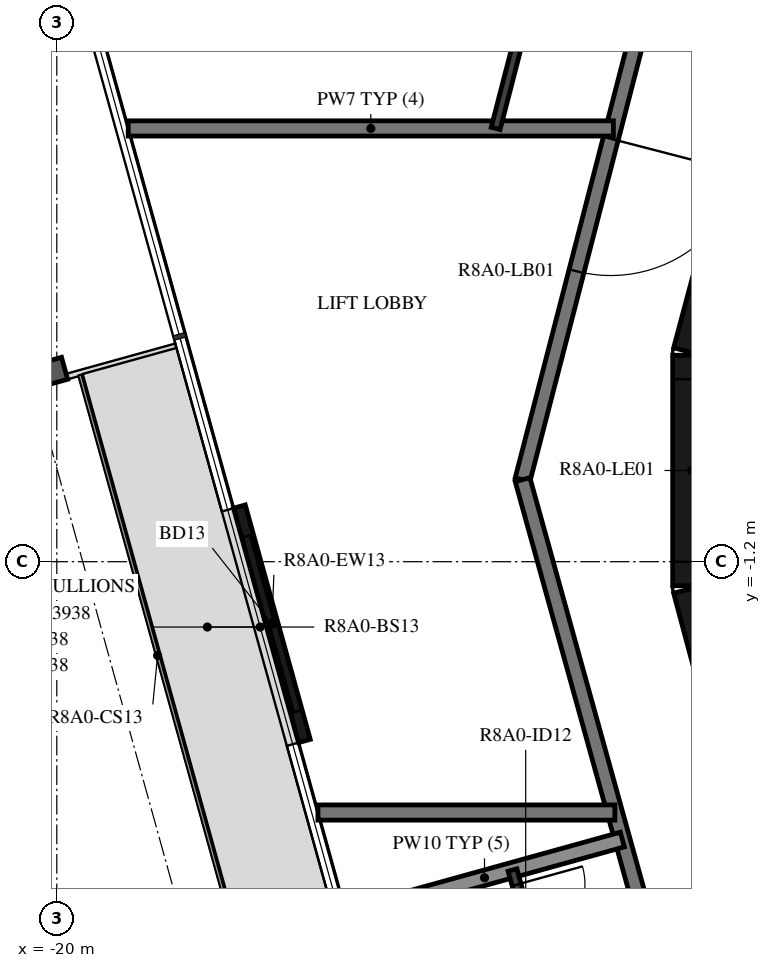
"""IFC4 building model, lengths in metres.
Left out: names, types, materials, properties, quantities, classifications, styles, units other than length and angle.
Written with IfcOpenShell. Run it as: python <this file> out.ifc"""

import sys

from ifc_helpers import new_model, si_unit, direction, frame, frame_2d, origin, origin_2d, place, context, subcontext, project, spatial, rectangle, i_section, extrude, element, fill, save


model = new_model("IFC4")
c1 = context("Model", 3, precision=1e-05, world=origin(), true_north=direction((0.0, 1.0)))
c2 = subcontext(c1, "Body", "Model", "MODEL_VIEW")
j1 = project(units=[si_unit("LENGTHUNIT", "METRE"), si_unit("PLANEANGLEUNIT", "RADIAN")], contexts=[c1])
p1 = place(None, origin())
s1 = spatial("IfcSite", under=j1, at=p1, CompositionType="ELEMENT")
p2 = place(p1, origin())
s2 = spatial("IfcBuilding", under=s1, at=p2, CompositionType="ELEMENT")
p3 = place(p2, frame((0.0, 0.0, 305.2)))
s3 = spatial("IfcBuildingStorey", under=s2, at=p3, CompositionType="ELEMENT", Elevation=305.2)
p4 = place(p3, frame((-20.331, 1.224, -0.38), z_axis=(0.0, 0.0, 1.0), x_axis=(-0.267238143562, 0.963630517691, 0.0)))
e1 = element("IfcColumn", 1, at=p4, inside=s3, PredefinedType="COLUMN", context=c2, shape_type="SweptSolid", body=[
    extrude(i_section(OverallWidth=0.3, OverallDepth=0.9, WebThickness=0.019, FlangeThickness=0.035, FilletRadius=0.03, at=origin_2d()), origin(), (0.0, 0.0, 1.0), 3.5),
])
p5 = place(p3, frame((-17.598, -0.475, 0.0), z_axis=(0.0, 0.0, 1.0), x_axis=(0.267266077957, -0.963622770369, 0.0)))
e2 = element("IfcWall", 2, at=p5, inside=s3, PredefinedType="STANDARD", context=c2, shape_type="SweptSolid", body=[
    extrude(rectangle(XDim=3.2, YDim=0.16, at=frame_2d((1.6, 0.0))), origin(), (0.0, 0.0, 1.0), 3.12),
])
p6 = place(p5, frame((0.4, 0.0, 0.0)))
e3 = element("IfcOpeningElement", 3, at=p6, cuts=e2, PredefinedType="OPENING", context=c2, shape_type="SweptSolid", body=[
    extrude(rectangle(XDim=2.4, YDim=2.4, at=frame_2d((1.2, 1.2))), frame((0.0, 0.09, 0.0), z_axis=(0.0, -1.0, 0.0), x_axis=(1.0, 0.0, 0.0)), (0.0, 0.0, 1.0), 0.18),
])
p7 = place(p3, frame((-10.858, 4.479, 0.0), z_axis=(0.0, 0.0, 1.0), x_axis=(-0.258734743916, -0.965948410781, 0.0)))
e4 = element("IfcWall", 4, at=p7, inside=s3, PredefinedType="SHEAR", context=c2, shape_type="SweptSolid", body=[
    extrude(rectangle(XDim=3.033, YDim=0.5, at=frame_2d((1.516, 0.0))), origin(), (0.0, 0.0, 1.0), 3.12),
])
p8 = place(p3, frame((-11.647, 1.516, 0.0), z_axis=(0.0, 0.0, 1.0), x_axis=(0.0, -1.0, 0.0)))
e5 = element("IfcWall", 5, at=p8, inside=s3, PredefinedType="SHEAR", context=c2, shape_type="SweptSolid", body=[
    extrude(rectangle(XDim=3.033, YDim=0.5, at=frame_2d((1.516, 0.0))), origin(), (0.0, 0.0, 1.0), 3.12),
])
p9 = place(p8, frame((0.316, 0.0, 0.0)))
e6 = element("IfcOpeningElement", 6, at=p9, cuts=e5, PredefinedType="OPENING", context=c2, shape_type="SweptSolid", body=[
    extrude(rectangle(XDim=2.4, YDim=2.1, at=frame_2d((1.2, 1.05))), frame((0.0, 0.26, 0.0), z_axis=(0.0, -1.0, 0.0), x_axis=(1.0, 0.0, 0.0)), (0.0, 0.0, 1.0), 0.52),
])
p10 = place(p3, frame((-11.643, -1.55, 0.0), z_axis=(0.0, 0.0, 1.0), x_axis=(0.258734743916, -0.965948410781, 0.0)))
e7 = element("IfcWall", 7, at=p10, inside=s3, PredefinedType="SHEAR", context=c2, shape_type="SweptSolid", body=[
    extrude(rectangle(XDim=3.033, YDim=0.5, at=frame_2d((1.516, 0.0))), origin(), (0.0, 0.0, 1.0), 3.12),
])
p11 = place(p10, frame((1.066, 0.0, 0.0)))
e8 = element("IfcOpeningElement", 8, at=p11, cuts=e7, PredefinedType="OPENING", context=c2, shape_type="SweptSolid", body=[
    extrude(rectangle(XDim=0.9, YDim=2.1, at=frame_2d((0.45, 1.05))), frame((0.0, 0.26, 0.0), z_axis=(0.0, -1.0, 0.0), x_axis=(1.0, 0.0, 0.0)), (0.0, 0.0, 1.0), 0.52),
])
p12 = place(p3, frame((-12.074, 6.831, 0.0), z_axis=(0.0, 0.0, 1.0), x_axis=(-0.250391063186, -0.968144780225, 0.0)))
e9 = element("IfcWall", 9, at=p12, inside=s3, PredefinedType="STANDARD", context=c2, shape_type="SweptSolid", body=[
    extrude(rectangle(XDim=7.181, YDim=0.2, at=frame_2d((3.591, 0.0))), origin(), (0.0, 0.0, 1.0), 3.12),
])
p13 = place(p12, frame((2.548, 0.0, 0.0)))
e10 = element("IfcOpeningElement", 10, at=p13, cuts=e9, PredefinedType="OPENING", context=c2, shape_type="SweptSolid", body=[
    extrude(rectangle(XDim=1.8, YDim=2.1, at=frame_2d((0.9, 1.05))), frame((0.0, 0.11, 0.0), z_axis=(0.0, -1.0, 0.0), x_axis=(1.0, 0.0, 0.0)), (0.0, 0.0, 1.0), 0.22),
])
p14 = place(p3, frame((-13.872, -0.121, 0.0), z_axis=(0.0, 0.0, 1.0), x_axis=(0.267254575108, -0.963625960674, 0.0)))
e11 = element("IfcWall", 11, at=p14, inside=s3, PredefinedType="STANDARD", context=c2, shape_type="SweptSolid", body=[
    extrude(rectangle(XDim=7.181, YDim=0.2, at=frame_2d((3.591, 0.0))), origin(), (0.0, 0.0, 1.0), 3.12),
])
p15 = place(p3, frame((-12.677, 4.5, 0.0), z_axis=(0.0, 0.0, 1.0), x_axis=(-1.0, 0.0, 0.0)))
e12 = element("IfcWall", 12, at=p15, inside=s3, PredefinedType="STANDARD", context=c2, shape_type="SweptSolid", body=[
    extrude(rectangle(XDim=6.383, YDim=0.2, at=frame_2d((3.192, 0.0))), origin(), (0.0, 0.0, 1.0), 3.12),
])
p16 = place(p3, frame((-16.564, -4.5, 0.0), z_axis=(0.0, 0.0, 1.0), x_axis=(1.0, 0.0, 0.0)))
e13 = element("IfcWall", 13, at=p16, inside=s3, PredefinedType="STANDARD", context=c2, shape_type="SweptSolid", body=[
    extrude(rectangle(XDim=3.907, YDim=0.2, at=frame_2d((1.953, 0.0))), origin(), (0.0, 0.0, 1.0), 3.12),
])
p17 = place(p3, frame((-16.187, -5.862, 0.0), z_axis=(0.0, 0.0, 1.0), x_axis=(0.963631166683, 0.267235803358, 0.0)))
e14 = element("IfcWall", 14, at=p17, inside=s3, PredefinedType="STANDARD", context=c2, shape_type="SweptSolid", body=[
    extrude(rectangle(XDim=3.765, YDim=0.2, at=frame_2d((1.882, 0.0))), origin(), (0.0, 0.0, 1.0), 2.73),
])
p18 = place(p3, frame((-13.701, 6.533, 0.0), z_axis=(0.0, 0.0, 1.0), x_axis=(-0.250352755349, -0.968154686963, 0.0)))
e15 = element("IfcWall", 15, at=p18, inside=s3, PredefinedType="PARTITIONING", context=c2, shape_type="SweptSolid", body=[
    extrude(rectangle(XDim=2.1, YDim=0.12, at=frame_2d((1.05, 0.0))), origin(), (0.0, 0.0, 1.0), 3.12),
])
p19 = place(p3, frame((-14.005, -5.256, 0.0), z_axis=(0.0, 0.0, 1.0), x_axis=(0.267200500487, -0.963640956238, 0.0)))
e16 = element("IfcWall", 16, at=p19, inside=s3, PredefinedType="PARTITIONING", context=c2, shape_type="SweptSolid", body=[
    extrude(rectangle(XDim=2.67, YDim=0.12, at=frame_2d((1.335, 0.0))), origin(), (0.0, 0.0, 1.0), 3.12),
])
p20 = place(p19, frame((0.2, 0.0, 0.0)))
e17 = element("IfcOpeningElement", 17, at=p20, cuts=e16, PredefinedType="OPENING", context=c2, shape_type="SweptSolid", body=[
    extrude(rectangle(XDim=0.9, YDim=2.1, at=frame_2d((0.45, 1.05))), frame((0.0, 0.07, 0.0), z_axis=(0.0, -1.0, 0.0), x_axis=(1.0, 0.0, 0.0)), (0.0, 0.0, 1.0), 0.14),
])
p21 = place(p6, origin())
e18 = element("IfcDoor", 18, at=p21, inside=s3, OperationType="DOUBLE_DOOR_SLIDING", PredefinedType="DOOR", context=c2, shape_type="SweptSolid", body=[
    extrude(rectangle(XDim=2.4, YDim=2.4, at=frame_2d((1.2, 1.2))), frame((0.0, 0.025, 0.0), z_axis=(0.0, -1.0, 0.0), x_axis=(1.0, 0.0, 0.0)), (0.0, 0.0, 1.0), 0.05),
])
fill(e3, e18)
p22 = place(p9, origin())
e19 = element("IfcDoor", 19, at=p22, inside=s3, OperationType="DOUBLE_DOOR_SINGLE_SWING", PredefinedType="DOOR", context=c2, shape_type="SweptSolid", body=[
    extrude(rectangle(XDim=2.4, YDim=2.1, at=frame_2d((1.2, 1.05))), frame((0.0, 0.025, 0.0), z_axis=(0.0, -1.0, 0.0), x_axis=(1.0, 0.0, 0.0)), (0.0, 0.0, 1.0), 0.05),
])
fill(e6, e19)
p23 = place(p20, origin())
e20 = element("IfcDoor", 20, at=p23, inside=s3, OperationType="SINGLE_SWING_RIGHT", PredefinedType="DOOR", context=c2, shape_type="SweptSolid", body=[
    extrude(rectangle(XDim=0.9, YDim=2.1, at=frame_2d((0.45, 1.05))), frame((0.0, 0.025, 0.0), z_axis=(0.0, -1.0, 0.0), x_axis=(1.0, 0.0, 0.0)), (0.0, 0.0, 1.0), 0.05),
])
fill(e17, e20)
p24 = place(p13, origin())
e21 = element("IfcDoor", 21, at=p24, inside=s3, OperationType="DOUBLE_DOOR_SINGLE_SWING", PredefinedType="DOOR", context=c2, shape_type="SweptSolid", body=[
    extrude(rectangle(XDim=1.8, YDim=2.1, at=frame_2d((0.9, 1.05))), frame((0.0, 0.025, 0.0), z_axis=(0.0, -1.0, 0.0), x_axis=(1.0, 0.0, 0.0)), (0.0, 0.0, 1.0), 0.05),
])
fill(e10, e21)
save(model, sys.argv[1])
